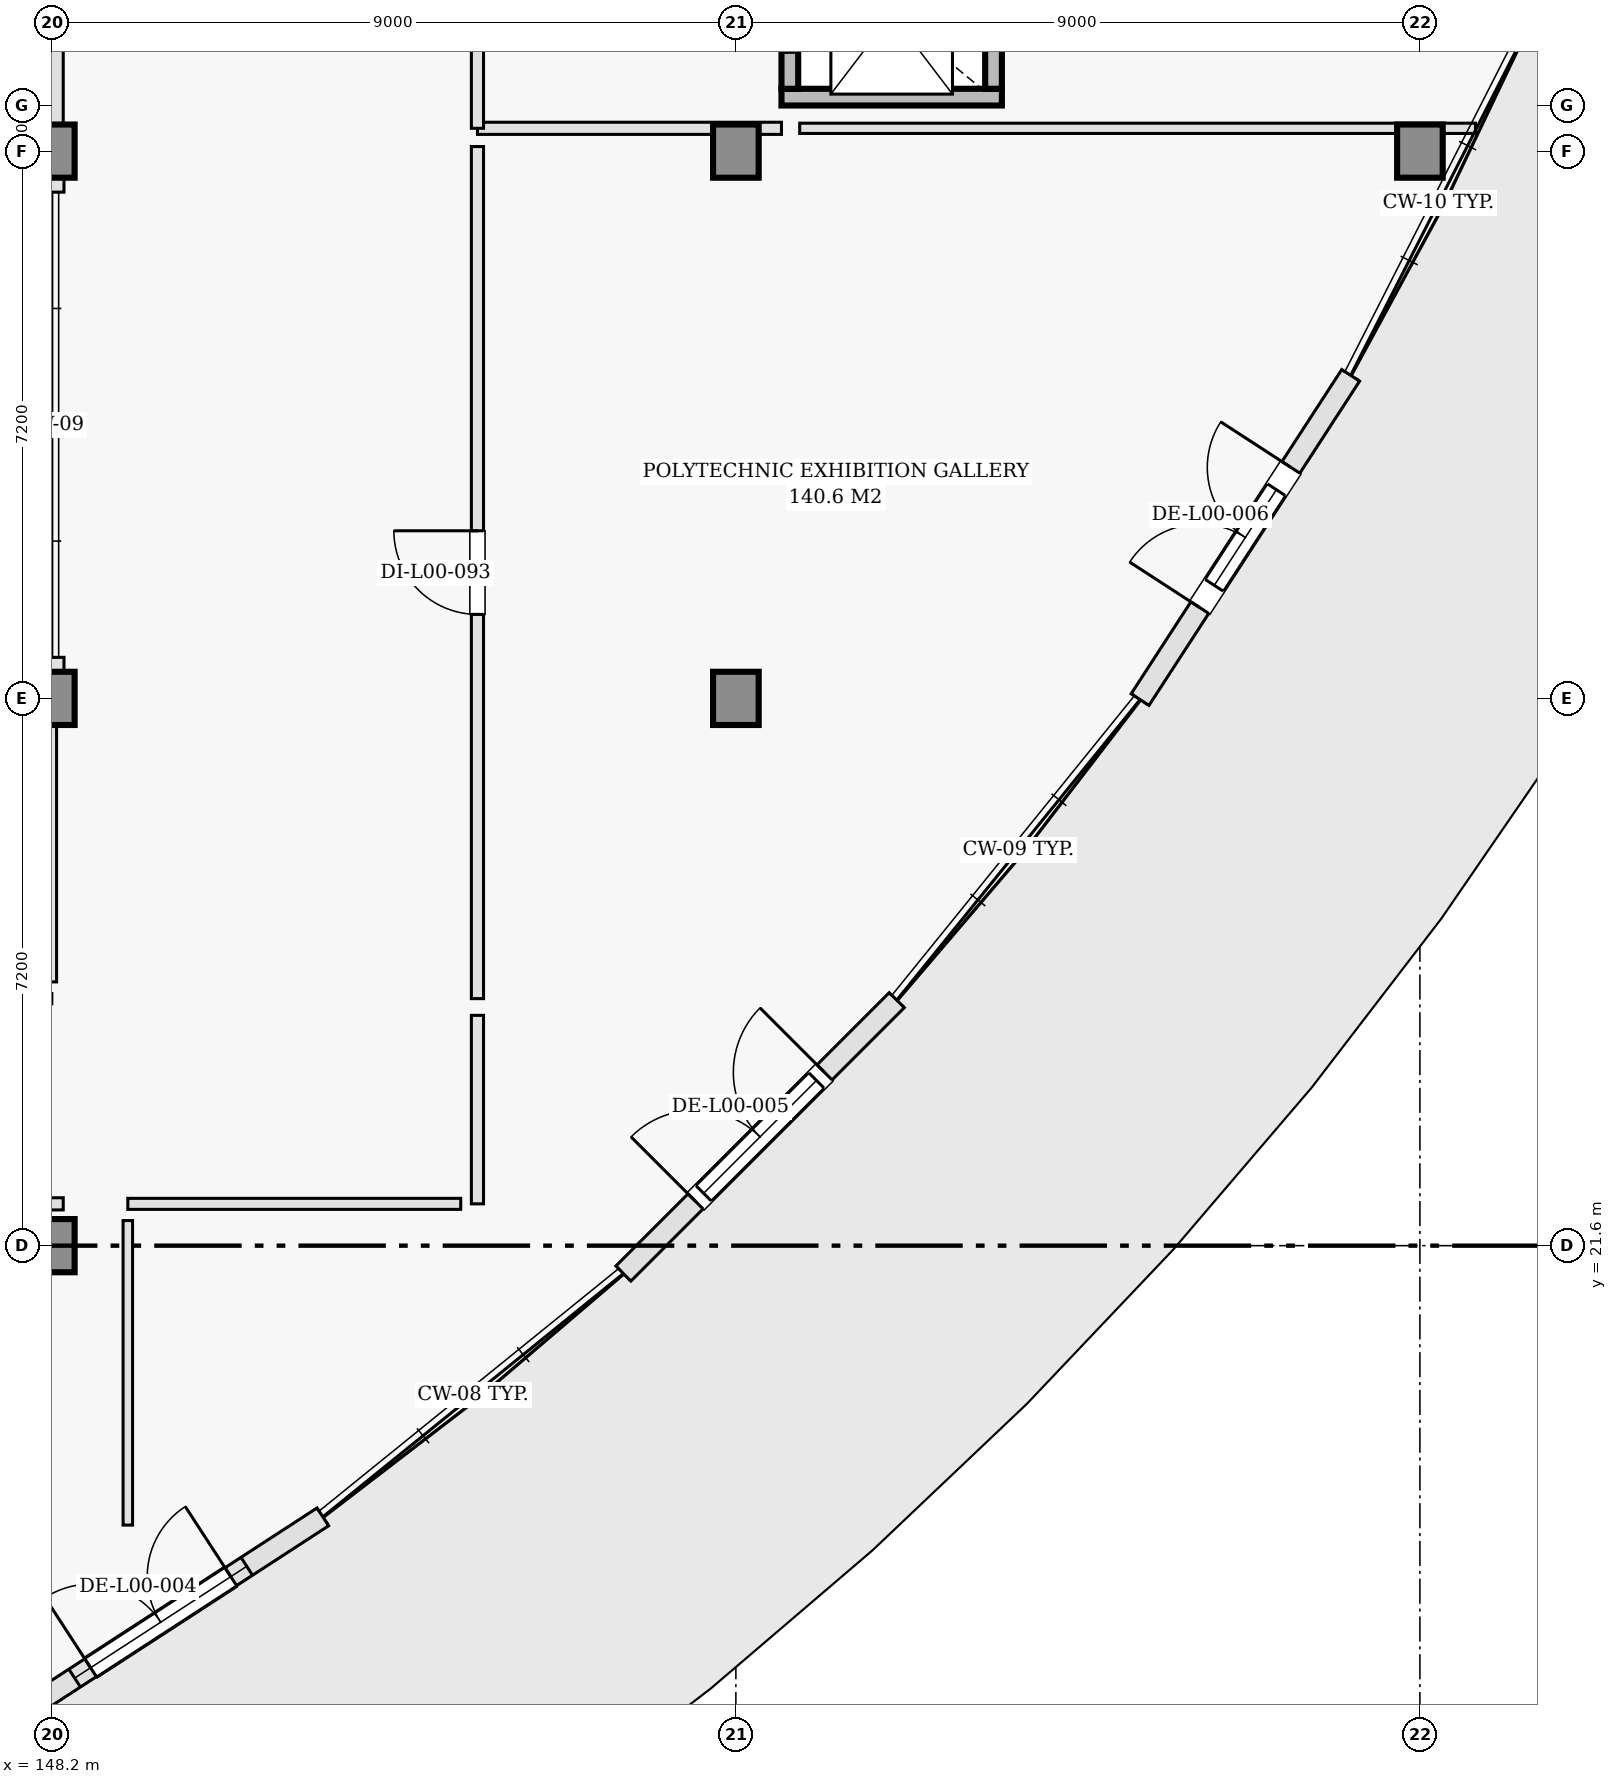
"""IFC4 building model, lengths in metres.
Left out: names, types, materials, properties, quantities, classifications, styles, units other than length and angle.
Written with IfcOpenShell. Run it as: python <this file> out.ifc"""

import sys

from ifc_helpers import new_model, si_unit, direction, frame, frame_2d, origin, origin_2d, place, context, subcontext, project, spatial, rectangle, extrude, element, fill, save


model = new_model("IFC4")
c1 = context("Model", 3, precision=1e-05, world=origin(), true_north=direction((0.0, 1.0)))
c2 = subcontext(c1, "Body", "Model", "MODEL_VIEW")
j1 = project(units=[si_unit("LENGTHUNIT", "METRE"), si_unit("PLANEANGLEUNIT", "RADIAN")], contexts=[c1])
p1 = place(None, origin())
s1 = spatial("IfcSite", under=j1, at=p1, CompositionType="ELEMENT")
p2 = place(p1, origin())
s2 = spatial("IfcBuilding", under=s1, at=p2, CompositionType="ELEMENT")
p3 = place(p2, origin())
s3 = spatial("IfcBuildingStorey", under=s2, at=p3, CompositionType="ELEMENT", Elevation=0.0)
for number, where, z_axis, x_axis in (
    (1, (148.2, 21.6, 0.0), (0.0, 0.0, 1.0), (1.0, 0.0, 0.0)),
    (2, (148.2, 28.8, 0.0), (0.0, 0.0, 1.0), (1.0, 0.0, 0.0)),
    (3, (148.2, 36.0, 0.0), (0.0, 0.0, 1.0), (1.0, 0.0, 0.0)),
    (4, (157.2, 28.8, 0.0), (0.0, 0.0, 1.0), (1.0, 0.0, 0.0)),
    (5, (157.2, 36.0, 0.0), (0.0, 0.0, 1.0), (1.0, 0.0, 0.0)),
    (6, (166.2, 36.0, 0.0), (0.0, 0.0, 1.0), (1.0, 0.0, 0.0)),
):
    element("IfcColumn", number, at=place(p3, frame(where, z_axis=z_axis, x_axis=x_axis)), inside=s3, PredefinedType="COLUMN", context=c2, shape_type="SweptSolid", body=[
        extrude(rectangle(XDim=0.7, YDim=0.7, at=origin_2d()), origin(), (0.0, 0.0, 1.0), 4.8),
    ])
p4 = place(p3, frame((147.5, 15.261, 0.0), z_axis=(0.0, 0.0, 1.0), x_axis=(0.838621203111, 0.544715042653, 0.0)))
e7 = element("IfcWall", 7, at=p4, inside=s3, PredefinedType="SOLIDWALL", context=c2, shape_type="SweptSolid", body=[
    extrude(rectangle(XDim=5.087, YDim=0.28, at=frame_2d((2.543, 0.0))), origin(), (0.0, 0.0, 1.0), 4.52),
])
p5 = place(p4, frame((1.443, 0.0, 0.0)))
e8 = element("IfcOpeningElement", 8, at=p5, cuts=e7, PredefinedType="OPENING", context=c2, shape_type="SweptSolid", body=[
    extrude(rectangle(XDim=2.2, YDim=2.35, at=frame_2d((1.1, 1.175))), frame((0.0, 0.15, 0.0), z_axis=(0.0, -1.0, 0.0), x_axis=(1.0, 0.0, 0.0)), (0.0, 0.0, 1.0), 0.3),
])
p6 = place(p4, frame((1.193, 0.0, 2.53)))
e9 = element("IfcOpeningElement", 9, at=p6, cuts=e7, PredefinedType="OPENING", context=c2, shape_type="SweptSolid", body=[
    extrude(rectangle(XDim=2.7, YDim=1.05, at=frame_2d((1.35, 0.525))), frame((0.0, 0.15, 0.0), z_axis=(0.0, -1.0, 0.0), x_axis=(1.0, 0.0, 0.0)), (0.0, 0.0, 1.0), 0.3),
])
p7 = place(p3, frame((155.72, 21.233, 0.0), z_axis=(0.0, 0.0, 1.0), x_axis=(0.707082784214, 0.707130777344, 0.0)))
e10 = element("IfcWall", 10, at=p7, inside=s3, PredefinedType="SOLIDWALL", context=c2, shape_type="SweptSolid", body=[
    extrude(rectangle(XDim=5.087, YDim=0.28, at=frame_2d((2.543, 0.0))), origin(), (0.0, 0.0, 1.0), 4.52),
])
p8 = place(p7, frame((1.343, 0.0, 0.0)))
e11 = element("IfcOpeningElement", 11, at=p8, cuts=e10, PredefinedType="OPENING", context=c2, shape_type="SweptSolid", body=[
    extrude(rectangle(XDim=2.4, YDim=2.4, at=frame_2d((1.2, 1.2))), frame((0.0, 0.15, 0.0), z_axis=(0.0, -1.0, 0.0), x_axis=(1.0, 0.0, 0.0)), (0.0, 0.0, 1.0), 0.3),
])
p9 = place(p7, frame((1.493, 0.0, 2.58)))
e12 = element("IfcOpeningElement", 12, at=p9, cuts=e10, PredefinedType="OPENING", context=c2, shape_type="SweptSolid", body=[
    extrude(rectangle(XDim=2.1, YDim=0.95, at=frame_2d((1.05, 0.475))), frame((0.0, 0.15, 0.0), z_axis=(0.0, -1.0, 0.0), x_axis=(1.0, 0.0, 0.0)), (0.0, 0.0, 1.0), 0.3),
])
p10 = place(p3, frame((162.518, 28.784, 0.0), z_axis=(0.0, 0.0, 1.0), x_axis=(0.544715042653, 0.838621203111, 0.0)))
e13 = element("IfcWall", 13, at=p10, inside=s3, PredefinedType="SOLIDWALL", context=c2, shape_type="SweptSolid", body=[
    extrude(rectangle(XDim=5.087, YDim=0.28, at=frame_2d((2.543, 0.0))), origin(), (0.0, 0.0, 1.0), 4.52),
])
p11 = place(p10, frame((1.443, 0.0, 0.0)))
e14 = element("IfcOpeningElement", 14, at=p11, cuts=e13, PredefinedType="OPENING", context=c2, shape_type="SweptSolid", body=[
    extrude(rectangle(XDim=2.2, YDim=2.35, at=frame_2d((1.1, 1.175))), frame((0.0, 0.15, 0.0), z_axis=(0.0, -1.0, 0.0), x_axis=(1.0, 0.0, 0.0)), (0.0, 0.0, 1.0), 0.3),
])
p12 = place(p10, frame((1.793, 0.0, 2.53)))
e15 = element("IfcOpeningElement", 15, at=p12, cuts=e13, PredefinedType="OPENING", context=c2, shape_type="SweptSolid", body=[
    extrude(rectangle(XDim=1.5, YDim=0.85, at=frame_2d((0.75, 0.425))), frame((0.0, 0.15, 0.0), z_axis=(0.0, -1.0, 0.0), x_axis=(1.0, 0.0, 0.0)), (0.0, 0.0, 1.0), 0.3),
])
p13 = place(p3, frame((148.2, 43.8, 0.0), z_axis=(0.0, 0.0, 1.0), x_axis=(0.0, -1.0, 0.0)))
e16 = element("IfcWall", 16, at=p13, inside=s3, PredefinedType="SOLIDWALL", context=c2, shape_type="SweptSolid", body=[
    extrude(rectangle(XDim=7.8, YDim=0.3, at=frame_2d((3.9, 0.0))), origin(), (0.0, 0.0, 1.0), 3.705),
])
p14 = place(p13, frame((2.7, 0.0, 0.0)))
e17 = element("IfcOpeningElement", 17, at=p14, cuts=e16, PredefinedType="OPENING", context=c2, shape_type="SweptSolid", body=[
    extrude(rectangle(XDim=2.4, YDim=2.4, at=frame_2d((1.2, 1.2))), frame((0.0, 0.16, 0.0), z_axis=(0.0, -1.0, 0.0), x_axis=(1.0, 0.0, 0.0)), (0.0, 0.0, 1.0), 0.32),
])
p15 = place(p3, frame((148.2, 36.0, 0.0), z_axis=(0.0, 0.0, 1.0), x_axis=(0.0, -1.0, 0.0)))
e18 = element("IfcWall", 18, at=p15, inside=s3, PredefinedType="SOLIDWALL", context=c2, shape_type="SweptSolid", body=[
    extrude(rectangle(XDim=0.54, YDim=0.32, at=frame_2d((0.27, 0.0))), origin(), (0.0, 0.0, 1.0), 3.705),
])
p16 = place(p3, frame((148.2, 29.34, 0.0), z_axis=(0.0, 0.0, 1.0), x_axis=(0.0, -1.0, 0.0)))
e19 = element("IfcWall", 19, at=p16, inside=s3, PredefinedType="SOLIDWALL", context=c2, shape_type="SweptSolid", body=[
    extrude(rectangle(XDim=0.388, YDim=0.32, at=frame_2d((0.194, 0.0))), origin(), (0.0, 0.0, 1.0), 3.705),
])
p17 = place(p3, frame((157.8, 36.71, 0.0), z_axis=(0.0, 0.0, 1.0), x_axis=(1.0, 0.0, 0.0)))
e20 = element("IfcWall", 20, at=p17, inside=s3, PredefinedType="SHEAR", context=c2, shape_type="SweptSolid", body=[
    extrude(rectangle(XDim=2.9, YDim=0.22, at=frame_2d((1.45, 0.0))), origin(), (0.0, 0.0, 1.0), 4.52),
])
p18 = place(p3, frame((157.91, 36.82, 0.0), z_axis=(0.0, 0.0, 1.0), x_axis=(0.0, 1.0, 0.0)))
e21 = element("IfcWall", 21, at=p18, inside=s3, PredefinedType="SHEAR", context=c2, shape_type="SweptSolid", body=[
    extrude(rectangle(XDim=1.96, YDim=0.22, at=frame_2d((0.98, 0.0))), origin(), (0.0, 0.0, 1.0), 4.52),
])
p19 = place(p18, frame((0.48, 0.0, 0.0)))
e22 = element("IfcOpeningElement", 22, at=p19, cuts=e21, PredefinedType="OPENING", context=c2, shape_type="SweptSolid", body=[
    extrude(rectangle(XDim=1.0, YDim=2.15, at=frame_2d((0.5, 1.075))), frame((0.0, 0.12, 0.0), z_axis=(0.0, -1.0, 0.0), x_axis=(1.0, 0.0, 0.0)), (0.0, 0.0, 1.0), 0.24),
])
p20 = place(p3, frame((160.59, 36.82, 0.0), z_axis=(0.0, 0.0, 1.0), x_axis=(0.0, 1.0, 0.0)))
e23 = element("IfcWall", 23, at=p20, inside=s3, PredefinedType="SHEAR", context=c2, shape_type="SweptSolid", body=[
    extrude(rectangle(XDim=1.96, YDim=0.22, at=frame_2d((0.98, 0.0))), origin(), (0.0, 0.0, 1.0), 4.52),
])
p21 = place(p3, frame((153.8, 36.3, 0.0), z_axis=(0.0, 0.0, 1.0), x_axis=(1.0, 0.0, 0.0)))
e24 = element("IfcWall", 24, at=p21, inside=s3, PredefinedType="PARTITIONING", context=c2, shape_type="SweptSolid", body=[
    extrude(rectangle(XDim=4.0, YDim=0.16, at=frame_2d((2.0, 0.0))), origin(), (0.0, 0.0, 1.0), 3.705),
])
p22 = place(p3, frame((153.8, 36.3, 0.0), z_axis=(0.0, 0.0, 1.0), x_axis=(0.0, 1.0, 0.0)))
e25 = element("IfcWall", 25, at=p22, inside=s3, PredefinedType="PARTITIONING", context=c2, shape_type="SweptSolid", body=[
    extrude(rectangle(XDim=3.5, YDim=0.16, at=frame_2d((1.75, 0.0))), origin(), (0.0, 0.0, 1.0), 4.065),
])
p23 = place(p22, frame((1.2, 0.0, 0.0)))
e26 = element("IfcOpeningElement", 26, at=p23, cuts=e25, PredefinedType="OPENING", context=c2, shape_type="SweptSolid", body=[
    extrude(rectangle(XDim=1.1, YDim=2.15, at=frame_2d((0.55, 1.075))), frame((0.0, 0.09, 0.0), z_axis=(0.0, -1.0, 0.0), x_axis=(1.0, 0.0, 0.0)), (0.0, 0.0, 1.0), 0.18),
])
p24 = place(p3, frame((148.2, 25.07, 0.0), z_axis=(0.0, 0.0, 1.0), x_axis=(0.0, 1.0, 0.0)))
e27 = element("IfcWall", 27, at=p24, inside=s3, PredefinedType="PARTITIONING", context=c2, shape_type="SweptSolid", body=[
    extrude(rectangle(XDim=3.49, YDim=0.125, at=frame_2d((1.745, 0.0))), origin(), (0.0, 0.0, 1.0), 3.855),
])
p25 = place(p3, frame((153.8, 24.85, 0.0), z_axis=(0.0, 0.0, 1.0), x_axis=(0.0, 1.0, 0.0)))
e28 = element("IfcWall", 28, at=p25, inside=s3, PredefinedType="PARTITIONING", context=c2, shape_type="SweptSolid", body=[
    extrude(rectangle(XDim=11.21, YDim=0.16, at=frame_2d((5.605, 0.0))), origin(), (0.0, 0.0, 1.0), 3.705),
])
p26 = place(p25, frame((5.055, 0.0, 0.0)))
e29 = element("IfcOpeningElement", 29, at=p26, cuts=e28, PredefinedType="OPENING", context=c2, shape_type="SweptSolid", body=[
    extrude(rectangle(XDim=1.1, YDim=2.15, at=frame_2d((0.55, 1.075))), frame((0.0, 0.09, 0.0), z_axis=(0.0, -1.0, 0.0), x_axis=(1.0, 0.0, 0.0)), (0.0, 0.0, 1.0), 0.18),
])
p27 = place(p3, frame((153.8, 22.15, 0.0), z_axis=(0.0, 0.0, 1.0), x_axis=(0.0, 1.0, 0.0)))
e30 = element("IfcWall", 30, at=p27, inside=s3, PredefinedType="PARTITIONING", context=c2, shape_type="SweptSolid", body=[
    extrude(rectangle(XDim=2.48, YDim=0.16, at=frame_2d((1.24, 0.0))), origin(), (0.0, 0.0, 1.0), 4.52),
])
p28 = place(p3, frame((149.2, 22.15, 0.0), z_axis=(0.0, 0.0, 1.0), x_axis=(1.0, 0.0, 0.0)))
e31 = element("IfcWall", 31, at=p28, inside=s3, PredefinedType="PARTITIONING", context=c2, shape_type="SweptSolid", body=[
    extrude(rectangle(XDim=4.38, YDim=0.145, at=frame_2d((2.19, 0.0))), origin(), (0.0, 0.0, 1.0), 4.52),
])
p29 = place(p3, frame((158.04, 36.3, 0.0), z_axis=(0.0, 0.0, 1.0), x_axis=(1.0, 0.0, 0.0)))
e32 = element("IfcWall", 32, at=p29, inside=s3, PredefinedType="PARTITIONING", context=c2, shape_type="SweptSolid", body=[
    extrude(rectangle(XDim=8.891, YDim=0.135, at=frame_2d((4.445, 0.0))), origin(), (0.0, 0.0, 1.0), 3.705),
])
p30 = place(p3, frame((149.2, 17.924, 0.0), z_axis=(0.0, 0.0, 1.0), x_axis=(0.0, 1.0, 0.0)))
e33 = element("IfcWall", 33, at=p30, inside=s3, PredefinedType="PARTITIONING", context=c2, shape_type="SweptSolid", body=[
    extrude(rectangle(XDim=4.006, YDim=0.125, at=frame_2d((2.003, 0.0))), origin(), (0.0, 0.0, 1.0), 4.52),
])
p31 = place(p3, frame((141.45, 22.15, 0.0), z_axis=(0.0, 0.0, 1.0), x_axis=(1.0, 0.0, 0.0)))
e34 = element("IfcWall", 34, at=p31, inside=s3, PredefinedType="PARTITIONING", context=c2, shape_type="SweptSolid", body=[
    extrude(rectangle(XDim=6.9, YDim=0.16, at=frame_2d((3.45, 0.0))), origin(), (0.0, 0.0, 1.0), 3.855),
])
p32 = place(p5, origin())
e35 = element("IfcDoor", 35, at=p32, inside=s3, OperationType="DOUBLE_DOOR_SINGLE_SWING", PredefinedType="DOOR", context=c2, shape_type="SweptSolid", body=[
    extrude(rectangle(XDim=2.2, YDim=2.35, at=frame_2d((1.1, 1.175))), frame((0.0, 0.025, 0.0), z_axis=(0.0, -1.0, 0.0), x_axis=(1.0, 0.0, 0.0)), (0.0, 0.0, 1.0), 0.05),
])
fill(e8, e35)
p33 = place(p6, origin())
e36 = element("IfcWindow", 36, at=p33, inside=s3, PartitioningType="DOUBLE_PANEL_VERTICAL", PredefinedType="WINDOW", context=c2, shape_type="SweptSolid", body=[
    extrude(rectangle(XDim=2.7, YDim=1.05, at=frame_2d((1.35, 0.525))), frame((0.0, 0.03, 0.0), z_axis=(0.0, -1.0, 0.0), x_axis=(1.0, 0.0, 0.0)), (0.0, 0.0, 1.0), 0.06),
])
fill(e9, e36)
p34 = place(p8, origin())
e37 = element("IfcDoor", 37, at=p34, inside=s3, OperationType="DOUBLE_DOOR_SINGLE_SWING", PredefinedType="DOOR", context=c2, shape_type="SweptSolid", body=[
    extrude(rectangle(XDim=2.4, YDim=2.4, at=frame_2d((1.2, 1.2))), frame((0.0, 0.025, 0.0), z_axis=(0.0, -1.0, 0.0), x_axis=(1.0, 0.0, 0.0)), (0.0, 0.0, 1.0), 0.05),
])
fill(e11, e37)
p35 = place(p9, origin())
e38 = element("IfcWindow", 38, at=p35, inside=s3, PartitioningType="DOUBLE_PANEL_VERTICAL", PredefinedType="WINDOW", context=c2, shape_type="SweptSolid", body=[
    extrude(rectangle(XDim=2.1, YDim=0.95, at=frame_2d((1.05, 0.475))), frame((0.0, 0.03, 0.0), z_axis=(0.0, -1.0, 0.0), x_axis=(1.0, 0.0, 0.0)), (0.0, 0.0, 1.0), 0.06),
])
fill(e12, e38)
p36 = place(p11, origin())
e39 = element("IfcDoor", 39, at=p36, inside=s3, OperationType="DOUBLE_DOOR_SINGLE_SWING", PredefinedType="DOOR", context=c2, shape_type="SweptSolid", body=[
    extrude(rectangle(XDim=2.2, YDim=2.35, at=frame_2d((1.1, 1.175))), frame((0.0, 0.025, 0.0), z_axis=(0.0, -1.0, 0.0), x_axis=(1.0, 0.0, 0.0)), (0.0, 0.0, 1.0), 0.05),
])
fill(e14, e39)
p37 = place(p12, origin())
e40 = element("IfcWindow", 40, at=p37, inside=s3, PartitioningType="DOUBLE_PANEL_VERTICAL", PredefinedType="WINDOW", context=c2, shape_type="SweptSolid", body=[
    extrude(rectangle(XDim=1.5, YDim=0.85, at=frame_2d((0.75, 0.425))), frame((0.0, 0.03, 0.0), z_axis=(0.0, -1.0, 0.0), x_axis=(1.0, 0.0, 0.0)), (0.0, 0.0, 1.0), 0.06),
])
fill(e15, e40)
p38 = place(p26, origin())
e41 = element("IfcDoor", 41, at=p38, inside=s3, OperationType="SINGLE_SWING_RIGHT", PredefinedType="DOOR", context=c2, shape_type="SweptSolid", body=[
    extrude(rectangle(XDim=1.1, YDim=2.15, at=frame_2d((0.55, 1.075))), frame((0.0, 0.025, 0.0), z_axis=(0.0, -1.0, 0.0), x_axis=(1.0, 0.0, 0.0)), (0.0, 0.0, 1.0), 0.05),
])
fill(e29, e41)
save(model, sys.argv[1])
